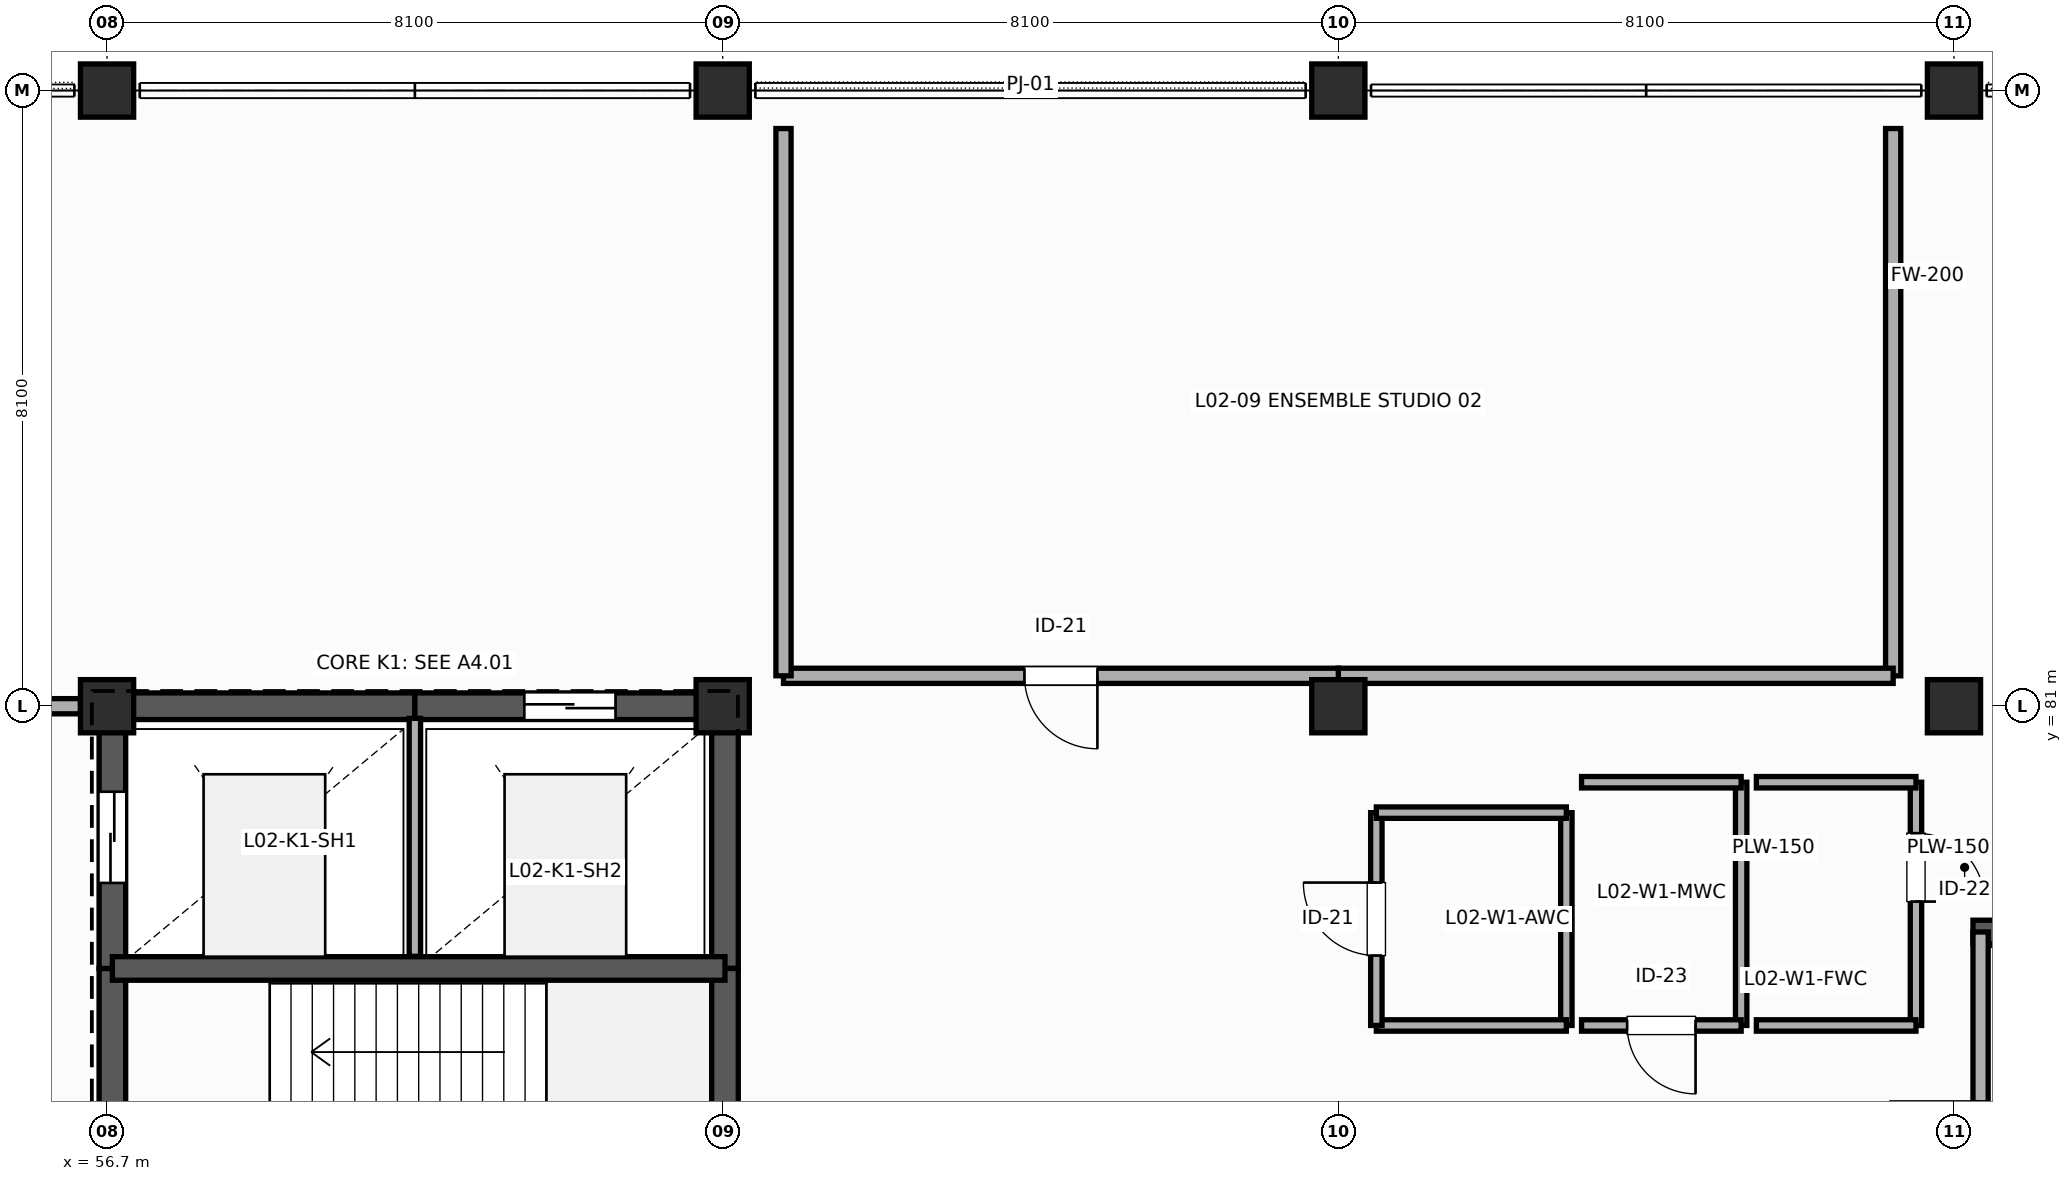
"""IFC4 building model, lengths in metres.
Left out: names, types, materials, properties, quantities, classifications, styles, units other than length and angle.
Written with IfcOpenShell. Run it as: python <this file> out.ifc"""

import sys

from ifc_helpers import new_model, si_unit, direction, frame, frame_2d, origin, origin_2d, place, context, subcontext, project, spatial, rectangle, extrude, element, fill, save


model = new_model("IFC4")
c1 = context("Model", 3, precision=1e-05, world=origin(), true_north=direction((0.0, 1.0)))
c2 = subcontext(c1, "Body", "Model", "MODEL_VIEW")
j1 = project(units=[si_unit("LENGTHUNIT", "METRE"), si_unit("PLANEANGLEUNIT", "RADIAN")], contexts=[c1])
p1 = place(None, origin())
s1 = spatial("IfcSite", under=j1, at=p1, CompositionType="ELEMENT")
p2 = place(p1, origin())
s2 = spatial("IfcBuilding", under=s1, at=p2, CompositionType="ELEMENT")
p3 = place(p2, frame((0.0, 0.0, 10.2)))
s3 = spatial("IfcBuildingStorey", under=s2, at=p3, CompositionType="ELEMENT", Elevation=10.2)
for number, where, z_axis, x_axis in (
    (1, (56.7, 81.0, 0.0), (0.0, 0.0, 1.0), (1.0, 0.0, 0.0)),
    (2, (56.7, 89.1, 0.0), (0.0, 0.0, 1.0), (1.0, 0.0, 0.0)),
    (3, (64.8, 81.0, 0.0), (0.0, 0.0, 1.0), (1.0, 0.0, 0.0)),
    (4, (64.8, 89.1, 0.0), (0.0, 0.0, 1.0), (1.0, 0.0, 0.0)),
    (5, (72.9, 81.0, 0.0), (0.0, 0.0, 1.0), (1.0, 0.0, 0.0)),
    (6, (72.9, 89.1, 0.0), (0.0, 0.0, 1.0), (1.0, 0.0, 0.0)),
    (7, (81.0, 81.0, 0.0), (0.0, 0.0, 1.0), (1.0, 0.0, 0.0)),
    (8, (81.0, 89.1, 0.0), (0.0, 0.0, 1.0), (1.0, 0.0, 0.0)),
):
    element("IfcColumn", number, at=place(p3, frame(where, z_axis=z_axis, x_axis=x_axis)), inside=s3, PredefinedType="COLUMN", context=c2, shape_type="SweptSolid", body=[
        extrude(rectangle(XDim=0.7, YDim=0.7, at=origin_2d()), origin(), (0.0, 0.0, 1.0), 4.8),
    ])
p4 = place(p3, frame((56.77, 73.13, 0.0), z_axis=(0.0, 0.0, 1.0), x_axis=(0.0, 1.0, 0.0)))
e9 = element("IfcWall", 9, at=p4, inside=s3, PredefinedType="SHEAR", context=c2, shape_type="SweptSolid", body=[
    extrude(rectangle(XDim=4.42, YDim=0.35, at=frame_2d((2.21, 0.0))), origin(), (0.0, 0.0, 1.0), 4.8),
])
p5 = place(p4, frame((1.35, 0.0, 0.0)))
e10 = element("IfcOpeningElement", 10, at=p5, cuts=e9, PredefinedType="OPENING", context=c2, shape_type="SweptSolid", body=[
    extrude(rectangle(XDim=1.2, YDim=2.25, at=frame_2d((0.6, 1.125))), frame((0.0, 0.185, 0.0), z_axis=(0.0, -1.0, 0.0), x_axis=(1.0, 0.0, 0.0)), (0.0, 0.0, 1.0), 0.37),
])
p6 = place(p3, frame((56.77, 77.55, 0.0), z_axis=(0.0, 0.0, 1.0), x_axis=(0.0, 1.0, 0.0)))
e11 = element("IfcWall", 11, at=p6, inside=s3, PredefinedType="SHEAR", context=c2, shape_type="SweptSolid", body=[
    extrude(rectangle(XDim=3.45, YDim=0.35, at=frame_2d((1.725, 0.0))), origin(), (0.0, 0.0, 1.0), 4.8),
])
p7 = place(p6, frame((1.125, 0.0, 0.0)))
e12 = element("IfcOpeningElement", 12, at=p7, cuts=e11, PredefinedType="OPENING", context=c2, shape_type="SweptSolid", body=[
    extrude(rectangle(XDim=1.2, YDim=2.2, at=frame_2d((0.6, 1.1))), frame((0.0, 0.185, 0.0), z_axis=(0.0, -1.0, 0.0), x_axis=(1.0, 0.0, 0.0)), (0.0, 0.0, 1.0), 0.37),
])
p8 = place(p3, frame((56.77, 81.0, 0.0), z_axis=(0.0, 0.0, 1.0), x_axis=(1.0, 0.0, 0.0)))
e13 = element("IfcWall", 13, at=p8, inside=s3, PredefinedType="SHEAR", context=c2, shape_type="SweptSolid", body=[
    extrude(rectangle(XDim=3.98, YDim=0.35, at=frame_2d((1.99, 0.0))), origin(), (0.0, 0.0, 1.0), 4.8),
])
p9 = place(p3, frame((60.75, 81.0, 0.0), z_axis=(0.0, 0.0, 1.0), x_axis=(1.0, 0.0, 0.0)))
e14 = element("IfcWall", 14, at=p9, inside=s3, PredefinedType="SHEAR", context=c2, shape_type="SweptSolid", body=[
    extrude(rectangle(XDim=4.08, YDim=0.35, at=frame_2d((2.04, 0.0))), origin(), (0.0, 0.0, 1.0), 4.8),
])
p10 = place(p9, frame((1.44, 0.0, 0.0)))
e15 = element("IfcOpeningElement", 15, at=p10, cuts=e14, PredefinedType="OPENING", context=c2, shape_type="SweptSolid", body=[
    extrude(rectangle(XDim=1.2, YDim=2.2, at=frame_2d((0.6, 1.1))), frame((0.0, 0.185, 0.0), z_axis=(0.0, -1.0, 0.0), x_axis=(1.0, 0.0, 0.0)), (0.0, 0.0, 1.0), 0.37),
])
p11 = place(p3, frame((64.83, 81.0, 0.0), z_axis=(0.0, 0.0, 1.0), x_axis=(0.0, -1.0, 0.0)))
e16 = element("IfcWall", 16, at=p11, inside=s3, PredefinedType="SHEAR", context=c2, shape_type="SweptSolid", body=[
    extrude(rectangle(XDim=3.45, YDim=0.35, at=frame_2d((1.725, 0.0))), origin(), (0.0, 0.0, 1.0), 4.8),
])
p12 = place(p3, frame((64.83, 77.55, 0.0), z_axis=(0.0, 0.0, 1.0), x_axis=(0.0, -1.0, 0.0)))
e17 = element("IfcWall", 17, at=p12, inside=s3, PredefinedType="SHEAR", context=c2, shape_type="SweptSolid", body=[
    extrude(rectangle(XDim=4.42, YDim=0.35, at=frame_2d((2.21, 0.0))), origin(), (0.0, 0.0, 1.0), 4.8),
])
p13 = place(p3, frame((56.77, 77.55, 0.0), z_axis=(0.0, 0.0, 1.0), x_axis=(1.0, 0.0, 0.0)))
e18 = element("IfcWall", 18, at=p13, inside=s3, PredefinedType="SHEAR", context=c2, shape_type="SweptSolid", body=[
    extrude(rectangle(XDim=8.06, YDim=0.31, at=frame_2d((4.03, 0.0))), origin(), (0.0, 0.0, 1.0), 4.8),
])
p14 = place(p3, frame((60.75, 77.71, 0.0), z_axis=(0.0, 0.0, 1.0), x_axis=(0.0, 1.0, 0.0)))
e19 = element("IfcWall", 19, at=p14, inside=s3, PredefinedType="PLUMBINGWALL", context=c2, shape_type="SweptSolid", body=[
    extrude(rectangle(XDim=3.13, YDim=0.15, at=frame_2d((1.565, 0.0))), origin(), (0.0, 0.0, 1.0), 4.45),
])
p15 = place(p3, frame((51.3, 81.0, 0.0), z_axis=(0.0, 0.0, 1.0), x_axis=(1.0, 0.0, 0.0)))
e20 = element("IfcWall", 20, at=p15, inside=s3, PredefinedType="PARTITIONING", context=c2, shape_type="SweptSolid", body=[
    extrude(rectangle(XDim=5.05, YDim=0.2, at=frame_2d((2.525, 0.0))), origin(), (0.0, 0.0, 1.0), 4.021),
])
p16 = place(p3, frame((89.795, 78.03, 0.0), z_axis=(0.0, 0.0, 1.0), x_axis=(-1.0, 0.0, 0.0)))
e21 = element("IfcWall", 21, at=p16, inside=s3, PredefinedType="SHEAR", context=c2, shape_type="SweptSolid", body=[
    extrude(rectangle(XDim=8.545, YDim=0.31, at=frame_2d((4.272, 0.0))), origin(), (0.0, 0.0, 1.0), 4.8),
])
p17 = place(p3, frame((81.35, 73.35, 0.0), z_axis=(0.0, 0.0, 1.0), x_axis=(0.0, 1.0, 0.0)))
e22 = element("IfcWall", 22, at=p17, inside=s3, PredefinedType="PARTITIONING", context=c2, shape_type="SweptSolid", body=[
    extrude(rectangle(XDim=4.68, YDim=0.2, at=frame_2d((2.34, 0.0))), origin(), (0.0, 0.0, 1.0), 4.45),
])
p18 = place(p17, frame((1.25, 0.0, 0.0)))
e23 = element("IfcOpeningElement", 23, at=p18, cuts=e22, PredefinedType="OPENING", context=c2, shape_type="SweptSolid", body=[
    extrude(rectangle(XDim=1.2, YDim=2.25, at=frame_2d((0.6, 1.125))), frame((0.0, 0.11, 0.0), z_axis=(0.0, -1.0, 0.0), x_axis=(1.0, 0.0, 0.0)), (0.0, 0.0, 1.0), 0.22),
])
p19 = place(p3, frame((75.9, 79.6, 0.0), z_axis=(0.0, 0.0, 1.0), x_axis=(0.0, -1.0, 0.0)))
e24 = element("IfcWall", 24, at=p19, inside=s3, PredefinedType="PLUMBINGWALL", context=c2, shape_type="SweptSolid", body=[
    extrude(rectangle(XDim=2.8, YDim=0.15, at=frame_2d((1.4, 0.0))), origin(), (0.0, 0.0, 1.0), 4.52),
])
p20 = place(p3, frame((75.9, 76.8, 0.0), z_axis=(0.0, 0.0, 1.0), x_axis=(-1.0, 0.0, 0.0)))
e25 = element("IfcWall", 25, at=p20, inside=s3, PredefinedType="PLUMBINGWALL", context=c2, shape_type="SweptSolid", body=[
    extrude(rectangle(XDim=2.5, YDim=0.15, at=frame_2d((1.25, 0.0))), origin(), (0.0, 0.0, 1.0), 4.52),
])
p21 = place(p3, frame((73.4, 76.8, 0.0), z_axis=(0.0, 0.0, 1.0), x_axis=(0.0, 1.0, 0.0)))
e26 = element("IfcWall", 26, at=p21, inside=s3, PredefinedType="PLUMBINGWALL", context=c2, shape_type="SweptSolid", body=[
    extrude(rectangle(XDim=2.8, YDim=0.15, at=frame_2d((1.4, 0.0))), origin(), (0.0, 0.0, 1.0), 4.52),
])
p22 = place(p21, frame((0.92, 0.0, 0.0)))
e27 = element("IfcOpeningElement", 27, at=p22, cuts=e26, PredefinedType="OPENING", context=c2, shape_type="SweptSolid", body=[
    extrude(rectangle(XDim=0.96, YDim=2.16, at=frame_2d((0.48, 1.08))), frame((0.0, 0.085, 0.0), z_axis=(0.0, -1.0, 0.0), x_axis=(1.0, 0.0, 0.0)), (0.0, 0.0, 1.0), 0.17),
])
p23 = place(p3, frame((73.4, 79.6, 0.0), z_axis=(0.0, 0.0, 1.0), x_axis=(1.0, 0.0, 0.0)))
e28 = element("IfcWall", 28, at=p23, inside=s3, PredefinedType="PLUMBINGWALL", context=c2, shape_type="SweptSolid", body=[
    extrude(rectangle(XDim=2.5, YDim=0.15, at=frame_2d((1.25, 0.0))), origin(), (0.0, 0.0, 1.0), 4.52),
])
p24 = place(p3, frame((78.2, 80.0, 0.0), z_axis=(0.0, 0.0, 1.0), x_axis=(0.0, -1.0, 0.0)))
e29 = element("IfcWall", 29, at=p24, inside=s3, PredefinedType="PLUMBINGWALL", context=c2, shape_type="SweptSolid", body=[
    extrude(rectangle(XDim=3.2, YDim=0.15, at=frame_2d((1.6, 0.0))), origin(), (0.0, 0.0, 1.0), 4.52),
])
p25 = place(p3, frame((78.2, 76.8, 0.0), z_axis=(0.0, 0.0, 1.0), x_axis=(-1.0, 0.0, 0.0)))
e30 = element("IfcWall", 30, at=p25, inside=s3, PredefinedType="PLUMBINGWALL", context=c2, shape_type="SweptSolid", body=[
    extrude(rectangle(XDim=2.1, YDim=0.15, at=frame_2d((1.05, 0.0))), origin(), (0.0, 0.0, 1.0), 4.52),
])
p26 = place(p25, frame((0.6, 0.0, 0.0)))
e31 = element("IfcOpeningElement", 31, at=p26, cuts=e30, PredefinedType="OPENING", context=c2, shape_type="SweptSolid", body=[
    extrude(rectangle(XDim=0.9, YDim=2.2, at=frame_2d((0.45, 1.1))), frame((0.0, 0.085, 0.0), z_axis=(0.0, -1.0, 0.0), x_axis=(1.0, 0.0, 0.0)), (0.0, 0.0, 1.0), 0.17),
])
p27 = place(p3, frame((76.1, 80.0, 0.0), z_axis=(0.0, 0.0, 1.0), x_axis=(1.0, 0.0, 0.0)))
e32 = element("IfcWall", 32, at=p27, inside=s3, PredefinedType="PLUMBINGWALL", context=c2, shape_type="SweptSolid", body=[
    extrude(rectangle(XDim=2.1, YDim=0.15, at=frame_2d((1.05, 0.0))), origin(), (0.0, 0.0, 1.0), 4.52),
])
p28 = place(p3, frame((80.5, 80.0, 0.0), z_axis=(0.0, 0.0, 1.0), x_axis=(0.0, -1.0, 0.0)))
e33 = element("IfcWall", 33, at=p28, inside=s3, PredefinedType="PLUMBINGWALL", context=c2, shape_type="SweptSolid", body=[
    extrude(rectangle(XDim=3.2, YDim=0.15, at=frame_2d((1.6, 0.0))), origin(), (0.0, 0.0, 1.0), 4.52),
])
p29 = place(p28, frame((0.67, 0.0, 0.0)))
e34 = element("IfcOpeningElement", 34, at=p29, cuts=e33, PredefinedType="OPENING", context=c2, shape_type="SweptSolid", body=[
    extrude(rectangle(XDim=0.9, YDim=2.1, at=frame_2d((0.45, 1.05))), frame((0.0, 0.085, 0.0), z_axis=(0.0, -1.0, 0.0), x_axis=(1.0, 0.0, 0.0)), (0.0, 0.0, 1.0), 0.17),
])
for number, where, z_axis, x_axis in (
    (35, (80.5, 76.8, 0.0), (0.0, 0.0, 1.0), (-1.0, 0.0, 0.0)),
    (36, (78.4, 80.0, 0.0), (0.0, 0.0, 1.0), (1.0, 0.0, 0.0)),
):
    element("IfcWall", number, at=place(p3, frame(where, z_axis=z_axis, x_axis=x_axis)), inside=s3, PredefinedType="PLUMBINGWALL", context=c2, shape_type="SweptSolid", body=[
        extrude(rectangle(XDim=2.1, YDim=0.15, at=frame_2d((1.05, 0.0))), origin(), (0.0, 0.0, 1.0), 4.52),
    ])
p30 = place(p3, frame((80.2, 88.6, 0.0), z_axis=(0.0, 0.0, 1.0), x_axis=(0.0, -1.0, 0.0)))
e37 = element("IfcWall", 37, at=p30, inside=s3, PredefinedType="PARTITIONING", context=c2, shape_type="SweptSolid", body=[
    extrude(rectangle(XDim=7.2, YDim=0.2, at=frame_2d((3.6, 0.0))), origin(), (0.0, 0.0, 1.0), 4.52),
])
p31 = place(p3, frame((80.2, 81.4, 0.0), z_axis=(0.0, 0.0, 1.0), x_axis=(-1.0, 0.0, 0.0)))
e38 = element("IfcWall", 38, at=p31, inside=s3, PredefinedType="PARTITIONING", context=c2, shape_type="SweptSolid", body=[
    extrude(rectangle(XDim=7.3, YDim=0.2, at=frame_2d((3.65, 0.0))), origin(), (0.0, 0.0, 1.0), 3.654),
])
p32 = place(p3, frame((72.9, 81.4, 0.0), z_axis=(0.0, 0.0, 1.0), x_axis=(-1.0, 0.0, 0.0)))
e39 = element("IfcWall", 39, at=p32, inside=s3, PredefinedType="PARTITIONING", context=c2, shape_type="SweptSolid", body=[
    extrude(rectangle(XDim=7.3, YDim=0.2, at=frame_2d((3.65, 0.0))), origin(), (0.0, 0.0, 1.0), 3.754),
])
p33 = place(p32, frame((3.17, 0.0, 0.0)))
e40 = element("IfcOpeningElement", 40, at=p33, cuts=e39, PredefinedType="OPENING", context=c2, shape_type="SweptSolid", body=[
    extrude(rectangle(XDim=0.96, YDim=2.16, at=frame_2d((0.48, 1.08))), frame((0.0, 0.11, 0.0), z_axis=(0.0, -1.0, 0.0), x_axis=(1.0, 0.0, 0.0)), (0.0, 0.0, 1.0), 0.22),
])
p34 = place(p3, frame((65.6, 81.4, 0.0), z_axis=(0.0, 0.0, 1.0), x_axis=(0.0, 1.0, 0.0)))
e41 = element("IfcWall", 41, at=p34, inside=s3, PredefinedType="PARTITIONING", context=c2, shape_type="SweptSolid", body=[
    extrude(rectangle(XDim=7.2, YDim=0.2, at=frame_2d((3.6, 0.0))), origin(), (0.0, 0.0, 1.0), 4.52),
])
p35 = place(p7, origin())
e42 = element("IfcDoor", 42, at=p35, inside=s3, OperationType="SLIDING_TO_LEFT", PredefinedType="DOOR", context=c2, shape_type="SweptSolid", body=[
    extrude(rectangle(XDim=1.2, YDim=2.2, at=frame_2d((0.6, 1.1))), frame((0.0, 0.025, 0.0), z_axis=(0.0, -1.0, 0.0), x_axis=(1.0, 0.0, 0.0)), (0.0, 0.0, 1.0), 0.05),
])
fill(e12, e42)
p36 = place(p10, origin())
e43 = element("IfcDoor", 43, at=p36, inside=s3, OperationType="SLIDING_TO_LEFT", PredefinedType="DOOR", context=c2, shape_type="SweptSolid", body=[
    extrude(rectangle(XDim=1.2, YDim=2.2, at=frame_2d((0.6, 1.1))), frame((0.0, 0.025, 0.0), z_axis=(0.0, -1.0, 0.0), x_axis=(1.0, 0.0, 0.0)), (0.0, 0.0, 1.0), 0.05),
])
fill(e15, e43)
p37 = place(p18, origin())
e44 = element("IfcDoor", 44, at=p37, inside=s3, OperationType="SINGLE_SWING_RIGHT", PredefinedType="DOOR", context=c2, shape_type="SweptSolid", body=[
    extrude(rectangle(XDim=1.2, YDim=2.25, at=frame_2d((0.6, 1.125))), frame((0.0, 0.025, 0.0), z_axis=(0.0, -1.0, 0.0), x_axis=(1.0, 0.0, 0.0)), (0.0, 0.0, 1.0), 0.05),
])
fill(e23, e44)
p38 = place(p22, origin())
e45 = element("IfcDoor", 45, at=p38, inside=s3, OperationType="SINGLE_SWING_RIGHT", PredefinedType="DOOR", context=c2, shape_type="SweptSolid", body=[
    extrude(rectangle(XDim=0.96, YDim=2.16, at=frame_2d((0.48, 1.08))), frame((0.0, 0.025, 0.0), z_axis=(0.0, -1.0, 0.0), x_axis=(1.0, 0.0, 0.0)), (0.0, 0.0, 1.0), 0.05),
])
fill(e27, e45)
p39 = place(p26, origin())
e46 = element("IfcDoor", 46, at=p39, inside=s3, OperationType="SINGLE_SWING_LEFT", PredefinedType="DOOR", context=c2, shape_type="SweptSolid", body=[
    extrude(rectangle(XDim=0.9, YDim=2.2, at=frame_2d((0.45, 1.1))), frame((0.0, 0.025, 0.0), z_axis=(0.0, -1.0, 0.0), x_axis=(1.0, 0.0, 0.0)), (0.0, 0.0, 1.0), 0.05),
])
fill(e31, e46)
p40 = place(p29, origin())
e47 = element("IfcDoor", 47, at=p40, inside=s3, OperationType="SINGLE_SWING_RIGHT", PredefinedType="DOOR", context=c2, shape_type="SweptSolid", body=[
    extrude(rectangle(XDim=0.9, YDim=2.1, at=frame_2d((0.45, 1.05))), frame((0.0, 0.025, 0.0), z_axis=(0.0, -1.0, 0.0), x_axis=(1.0, 0.0, 0.0)), (0.0, 0.0, 1.0), 0.05),
])
fill(e34, e47)
p41 = place(p33, origin())
e48 = element("IfcDoor", 48, at=p41, inside=s3, OperationType="SINGLE_SWING_LEFT", PredefinedType="DOOR", context=c2, shape_type="SweptSolid", body=[
    extrude(rectangle(XDim=0.96, YDim=2.16, at=frame_2d((0.48, 1.08))), frame((0.0, 0.025, 0.0), z_axis=(0.0, -1.0, 0.0), x_axis=(1.0, 0.0, 0.0)), (0.0, 0.0, 1.0), 0.05),
])
fill(e40, e48)
save(model, sys.argv[1])
